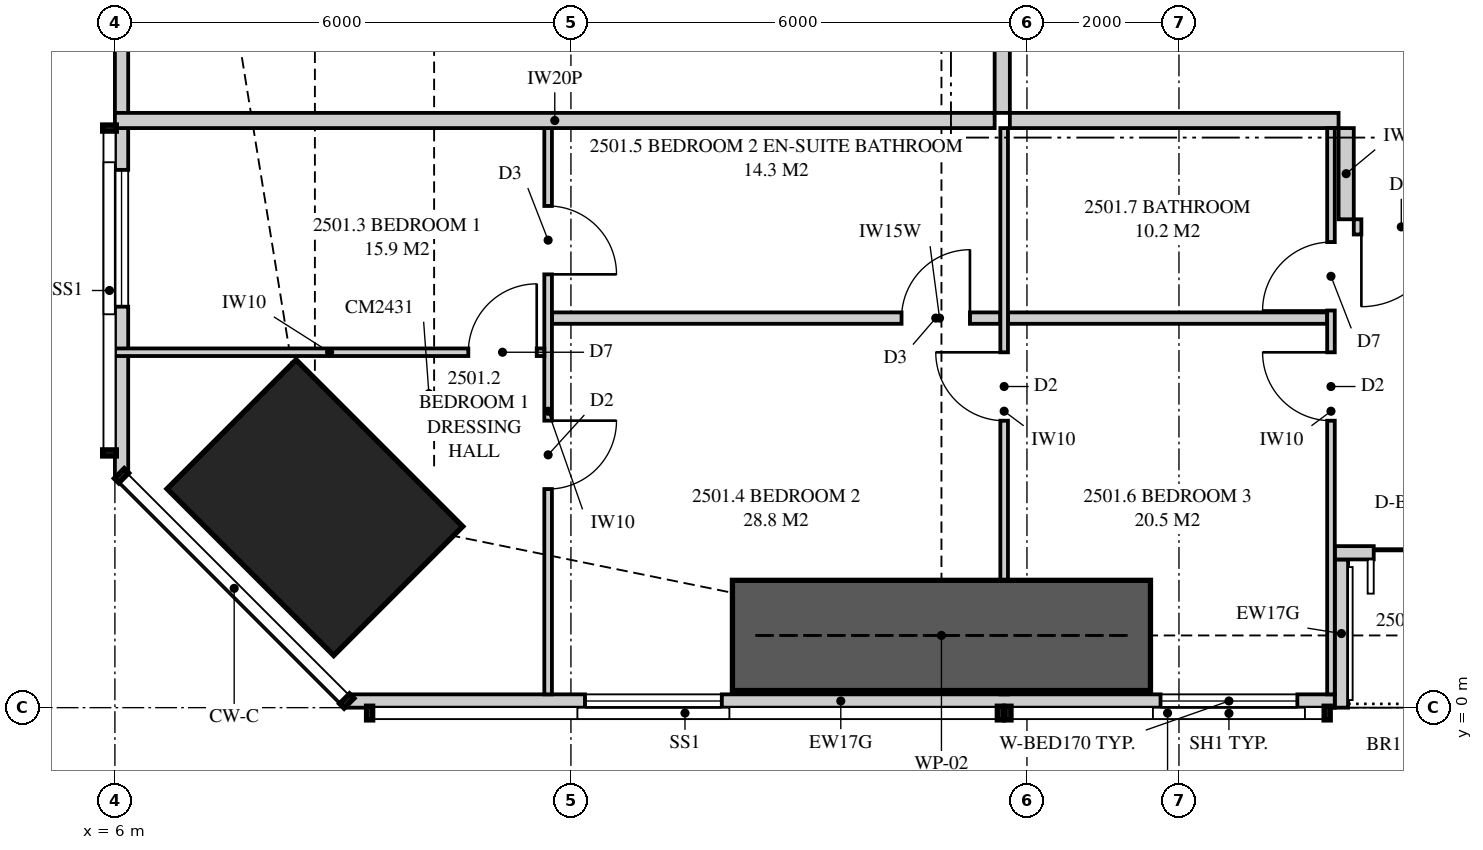
"""IFC4 building model, lengths in metres.
Left out: names, types, materials, properties, quantities, classifications, styles, units other than length and angle.
Written with IfcOpenShell. Run it as: python <this file> out.ifc"""

import sys

from ifc_helpers import new_model, si_unit, direction, frame, frame_2d, origin, origin_2d, place, context, subcontext, project, spatial, polyline, rectangle, outline, extrude, element, fill, save


model = new_model("IFC4")
c1 = context("Model", 3, precision=1e-05, world=origin(), true_north=direction((0.0, 1.0)))
c2 = subcontext(c1, "Body", "Model", "MODEL_VIEW")
j1 = project(units=[si_unit("LENGTHUNIT", "METRE"), si_unit("PLANEANGLEUNIT", "RADIAN")], contexts=[c1])
p1 = place(None, origin())
s1 = spatial("IfcSite", under=j1, at=p1, CompositionType="ELEMENT")
p2 = place(p1, origin())
s2 = spatial("IfcBuilding", under=s1, at=p2, CompositionType="ELEMENT")
p3 = place(p2, frame((0.0, 0.0, 94.8)))
s3 = spatial("IfcBuildingStorey", under=s2, at=p3, CompositionType="ELEMENT", Elevation=94.8)
p4 = place(p3, frame((8.631, 2.631, 0.0), z_axis=(0.0, 0.0, 1.0), x_axis=(0.707106781187, 0.707106781187, 0.0)))
e1 = element("IfcColumn", 1, at=p4, inside=s3, PredefinedType="COLUMN", context=c2, shape_type="SweptSolid", body=[
    extrude(rectangle(XDim=2.4, YDim=3.1, at=origin_2d()), origin(), (0.0, 0.0, 1.0), 3.35),
])
p5 = place(p3, frame((9.051, 0.087, 0.0), z_axis=(0.0, 0.0, 1.0), x_axis=(1.0, 0.0, 0.0)))
e2 = element("IfcWall", 2, at=p5, inside=s3, PredefinedType="SOLIDWALL", context=c2, shape_type="SweptSolid", body=[
    extrude(outline(polyline([(0.0, 0.0), (12.999, 0.0), (12.999, 2.15), (7.824, 2.15), (7.824, 3.11), (7.666, 3.11), (7.666, 2.15), (7.62, 2.15), (7.62, 3.11), (0.0, 3.11), (0.0, 0.0)])), frame((0.0, 0.087, 0.0), z_axis=(0.0, -1.0, 0.0), x_axis=(1.0, 0.0, 0.0)), (0.0, 0.0, 1.0), 0.175),
])
p6 = place(p5, frame((3.134, 0.0, 0.4)))
e3 = element("IfcOpeningElement", 3, at=p6, cuts=e2, PredefinedType="OPENING", context=c2, shape_type="SweptSolid", body=[
    extrude(rectangle(XDim=1.8, YDim=1.7, at=frame_2d((0.9, 0.85))), frame((0.0, 0.097, 0.0), z_axis=(0.0, -1.0, 0.0), x_axis=(1.0, 0.0, 0.0)), (0.0, 0.0, 1.0), 0.195),
])
p7 = place(p5, frame((10.706, 0.0, 0.4)))
e4 = element("IfcOpeningElement", 4, at=p7, cuts=e2, PredefinedType="OPENING", context=c2, shape_type="SweptSolid", body=[
    extrude(rectangle(XDim=1.8, YDim=1.7, at=frame_2d((0.9, 0.85))), frame((0.0, 0.097, 0.0), z_axis=(0.0, -1.0, 0.0), x_axis=(1.0, 0.0, 0.0)), (0.0, 0.0, 1.0), 0.195),
])
p8 = place(p3, frame((22.05, 2.038, 0.0), z_axis=(0.0, 0.0, 1.0), x_axis=(1.0, 0.0, 0.0)))
e5 = element("IfcWall", 5, at=p8, inside=s3, PredefinedType="SOLIDWALL", context=c2, shape_type="SweptSolid", body=[
    extrude(rectangle(XDim=2.825, YDim=0.175, at=frame_2d((1.413, 0.0))), origin(), (0.0, 0.0, 1.0), 3.11),
])
p9 = place(p8, frame((0.512, 0.0, 0.0)))
e6 = element("IfcOpeningElement", 6, at=p9, cuts=e5, PredefinedType="OPENING", context=c2, shape_type="SweptSolid", body=[
    extrude(rectangle(XDim=1.8, YDim=2.1, at=frame_2d((0.9, 1.05))), frame((0.0, 0.097, 0.0), z_axis=(0.0, -1.0, 0.0), x_axis=(1.0, 0.0, 0.0)), (0.0, 0.0, 1.0), 0.195),
])
p10 = place(p3, frame((22.137, 0.0, 0.0), z_axis=(0.0, 0.0, 1.0), x_axis=(0.0, 1.0, 0.0)))
e7 = element("IfcWall", 7, at=p10, inside=s3, PredefinedType="SOLIDWALL", context=c2, shape_type="SweptSolid", body=[
    extrude(outline(polyline([(0.0, 0.0), (1.95, 0.0), (1.95, 3.11), (1.75, 3.11), (1.75, 2.15), (0.15, 2.15), (0.15, 3.11), (0.0, 3.11), (0.0, 0.0)])), frame((0.0, 0.087, 0.0), z_axis=(0.0, -1.0, 0.0), x_axis=(1.0, 0.0, 0.0)), (0.0, 0.0, 1.0), 0.175),
])
p11 = place(p3, frame((6.087, 19.137, 0.0), z_axis=(0.0, 0.0, 1.0), x_axis=(0.0, -1.0, 0.0)))
e8 = element("IfcWall", 8, at=p11, inside=s3, PredefinedType="SOLIDWALL", context=c2, shape_type="SweptSolid", body=[
    extrude(outline(polyline([(0.0, 0.0), (16.086, 0.0), (16.086, 3.11), (6.356, 3.11), (6.356, 2.15), (6.263, 2.15), (6.263, 3.11), (6.137, 3.11), (6.137, 2.15), (0.0, 2.15), (0.0, 0.0)])), frame((0.0, 0.087, 0.0), z_axis=(0.0, -1.0, 0.0), x_axis=(1.0, 0.0, 0.0)), (0.0, 0.0, 1.0), 0.175),
])
p12 = place(p11, frame((1.481, 0.0, 0.4)))
e9 = element("IfcOpeningElement", 9, at=p12, cuts=e8, PredefinedType="OPENING", context=c2, shape_type="SweptSolid", body=[
    extrude(rectangle(XDim=1.8, YDim=1.7, at=frame_2d((0.9, 0.85))), frame((0.0, 0.097, 0.0), z_axis=(0.0, -1.0, 0.0), x_axis=(1.0, 0.0, 0.0)), (0.0, 0.0, 1.0), 0.195),
])
p13 = place(p11, frame((9.076, 0.0, 0.4)))
e10 = element("IfcOpeningElement", 10, at=p13, cuts=e8, PredefinedType="OPENING", context=c2, shape_type="SweptSolid", body=[
    extrude(rectangle(XDim=1.2, YDim=1.7, at=frame_2d((0.6, 0.85))), frame((0.0, 0.097, 0.0), z_axis=(0.0, -1.0, 0.0), x_axis=(1.0, 0.0, 0.0)), (0.0, 0.0, 1.0), 0.195),
])
p14 = place(p11, frame((12.062, 0.0, 0.4)))
e11 = element("IfcOpeningElement", 11, at=p14, cuts=e8, PredefinedType="OPENING", context=c2, shape_type="SweptSolid", body=[
    extrude(rectangle(XDim=1.8, YDim=1.7, at=frame_2d((0.9, 0.85))), frame((0.0, 0.097, 0.0), z_axis=(0.0, -1.0, 0.0), x_axis=(1.0, 0.0, 0.0)), (0.0, 0.0, 1.0), 0.195),
])
p15 = place(p3, frame((17.775, 7.725, 0.0), z_axis=(0.0, 0.0, 1.0), x_axis=(1.0, 0.0, 0.0)))
e12 = element("IfcWall", 12, at=p15, inside=s3, PredefinedType="PARTITIONING", context=c2, shape_type="SweptSolid", body=[
    extrude(rectangle(XDim=4.325, YDim=0.2, at=frame_2d((2.163, 0.0))), origin(), (0.0, 0.0, 1.0), 3.11),
])
p16 = place(p3, frame((11.7, 0.175, 0.0), z_axis=(0.0, 0.0, 1.0), x_axis=(0.0, 1.0, 0.0)))
e13 = element("IfcWall", 13, at=p16, inside=s3, PredefinedType="PARTITIONING", context=c2, shape_type="SweptSolid", body=[
    extrude(outline(polyline([(0.0, 0.0), (7.45, 0.0), (7.45, 3.11), (2.708, 3.11), (2.708, 2.15), (0.953, 2.15), (0.953, 3.11), (0.0, 3.11), (0.0, 0.0)])), frame((0.0, 0.05, 0.0), z_axis=(0.0, -1.0, 0.0), x_axis=(1.0, 0.0, 0.0)), (0.0, 0.0, 1.0), 0.1),
])
p17 = place(p16, frame((2.701, 0.0, 0.0)))
e14 = element("IfcOpeningElement", 14, at=p17, cuts=e13, PredefinedType="OPENING", context=c2, shape_type="SweptSolid", body=[
    extrude(rectangle(XDim=0.9, YDim=2.1, at=frame_2d((0.45, 1.05))), frame((0.0, 0.06, 0.0), z_axis=(0.0, -1.0, 0.0), x_axis=(1.0, 0.0, 0.0)), (0.0, 0.0, 1.0), 0.12),
])
p18 = place(p16, frame((5.525, 0.0, 0.0)))
e15 = element("IfcOpeningElement", 15, at=p18, cuts=e13, PredefinedType="OPENING", context=c2, shape_type="SweptSolid", body=[
    extrude(rectangle(XDim=0.9, YDim=2.1, at=frame_2d((0.45, 1.05))), frame((0.0, 0.06, 0.0), z_axis=(0.0, -1.0, 0.0), x_axis=(1.0, 0.0, 0.0)), (0.0, 0.0, 1.0), 0.12),
])
p19 = place(p3, frame((17.7, 0.175, 0.0), z_axis=(0.0, 0.0, 1.0), x_axis=(0.0, 1.0, 0.0)))
e16 = element("IfcWall", 16, at=p19, inside=s3, PredefinedType="PARTITIONING", context=c2, shape_type="SweptSolid", body=[
    extrude(outline(polyline([(1.635, 2.15), (0.0, 2.15), (0.0, 0.0), (7.45, 0.0), (7.45, 3.11), (1.635, 3.11), (1.635, 2.15)]), holes=[polyline([(1.021, 0.116), (0.529, 0.116), (0.529, 0.906), (1.021, 0.906), (1.021, 0.116)]), polyline([(1.021, 1.244), (0.529, 1.244), (0.529, 2.034), (1.021, 2.034), (1.021, 1.244)])]), frame((0.0, 0.05, 0.0), z_axis=(0.0, -1.0, 0.0), x_axis=(1.0, 0.0, 0.0)), (0.0, 0.0, 1.0), 0.1),
])
p20 = place(p19, frame((3.6, 0.0, 0.0)))
e17 = element("IfcOpeningElement", 17, at=p20, cuts=e16, PredefinedType="OPENING", context=c2, shape_type="SweptSolid", body=[
    extrude(rectangle(XDim=0.9, YDim=2.1, at=frame_2d((0.45, 1.05))), frame((0.0, 0.06, 0.0), z_axis=(0.0, -1.0, 0.0), x_axis=(1.0, 0.0, 0.0)), (0.0, 0.0, 1.0), 0.12),
])
p21 = place(p3, frame((22.0, 0.175, 0.0), z_axis=(0.0, 0.0, 1.0), x_axis=(0.0, 1.0, 0.0)))
e18 = element("IfcWall", 18, at=p21, inside=s3, PredefinedType="PARTITIONING", context=c2, shape_type="SweptSolid", body=[
    extrude(outline(polyline([(0.0, 0.0), (7.45, 0.0), (7.45, 3.11), (1.635, 3.11), (1.635, 2.15), (0.0, 2.15), (0.0, 3.11), (0.0, 0.0)])), frame((0.0, 0.05, 0.0), z_axis=(0.0, -1.0, 0.0), x_axis=(1.0, 0.0, 0.0)), (0.0, 0.0, 1.0), 0.1),
])
p22 = place(p21, frame((3.6, 0.0, 0.0)))
e19 = element("IfcOpeningElement", 19, at=p22, cuts=e18, PredefinedType="OPENING", context=c2, shape_type="SweptSolid", body=[
    extrude(rectangle(XDim=0.9, YDim=2.1, at=frame_2d((0.45, 1.05))), frame((0.0, 0.06, 0.0), z_axis=(0.0, -1.0, 0.0), x_axis=(1.0, 0.0, 0.0)), (0.0, 0.0, 1.0), 0.12),
])
p23 = place(p21, frame((5.05, 0.0, 0.0)))
e20 = element("IfcOpeningElement", 20, at=p23, cuts=e18, PredefinedType="OPENING", context=c2, shape_type="SweptSolid", body=[
    extrude(rectangle(XDim=0.9, YDim=2.1, at=frame_2d((0.45, 1.05))), frame((0.0, 0.06, 0.0), z_axis=(0.0, -1.0, 0.0), x_axis=(1.0, 0.0, 0.0)), (0.0, 0.0, 1.0), 0.12),
])
p24 = place(p3, frame((6.0, 4.676, 0.0), z_axis=(0.0, 0.0, 1.0), x_axis=(1.0, 0.0, 0.0)))
e21 = element("IfcWall", 21, at=p24, inside=s3, PredefinedType="PARTITIONING", context=c2, shape_type="SweptSolid", body=[
    extrude(outline(polyline([(0.0, 0.0), (5.65, 0.0), (5.65, 3.11), (5.46, 3.11), (5.46, 2.51), (3.171, 2.51), (3.171, 2.15), (1.429, 2.15), (1.429, 3.11), (0.0, 3.11), (0.0, 0.0)])), frame((0.0, 0.05, 0.0), z_axis=(0.0, -1.0, 0.0), x_axis=(1.0, 0.0, 0.0)), (0.0, 0.0, 1.0), 0.1),
])
p25 = place(p24, frame((4.65, 0.0, 0.0)))
e22 = element("IfcOpeningElement", 22, at=p25, cuts=e21, PredefinedType="OPENING", context=c2, shape_type="SweptSolid", body=[
    extrude(rectangle(XDim=0.9, YDim=2.1, at=frame_2d((0.45, 1.05))), frame((0.0, 0.06, 0.0), z_axis=(0.0, -1.0, 0.0), x_axis=(1.0, 0.0, 0.0)), (0.0, 0.0, 1.0), 0.12),
])
p26 = place(p3, frame((11.75, 5.125, 0.0), z_axis=(0.0, 0.0, 1.0), x_axis=(1.0, 0.0, 0.0)))
e23 = element("IfcWall", 23, at=p26, inside=s3, PredefinedType="PLUMBINGWALL", context=c2, shape_type="SweptSolid", body=[
    extrude(outline(polyline([(0.0, 0.0), (5.9, 0.0), (5.9, 3.11), (5.438, 3.11), (5.438, 2.541), (4.812, 2.541), (4.812, 3.11), (0.0, 3.11), (0.0, 0.0)])), frame((0.0, 0.075, 0.0), z_axis=(0.0, -1.0, 0.0), x_axis=(1.0, 0.0, 0.0)), (0.0, 0.0, 1.0), 0.15),
])
p27 = place(p26, frame((4.6, 0.0, 0.0)))
e24 = element("IfcOpeningElement", 24, at=p27, cuts=e23, PredefinedType="OPENING", context=c2, shape_type="SweptSolid", body=[
    extrude(rectangle(XDim=0.9, YDim=2.1, at=frame_2d((0.45, 1.05))), frame((0.0, 0.085, 0.0), z_axis=(0.0, -1.0, 0.0), x_axis=(1.0, 0.0, 0.0)), (0.0, 0.0, 1.0), 0.17),
])
p28 = place(p3, frame((17.75, 5.125, 0.0), z_axis=(0.0, 0.0, 1.0), x_axis=(1.0, 0.0, 0.0)))
e25 = element("IfcWall", 25, at=p28, inside=s3, PredefinedType="PLUMBINGWALL", context=c2, shape_type="SweptSolid", body=[
    extrude(rectangle(XDim=4.2, YDim=0.15, at=frame_2d((2.1, 0.0))), origin(), (0.0, 0.0, 1.0), 3.11),
])
p29 = place(p3, frame((6.0, 7.725, 0.0), z_axis=(0.0, 0.0, 1.0), x_axis=(1.0, 0.0, 0.0)))
e26 = element("IfcWall", 26, at=p29, inside=s3, PredefinedType="PARTITIONING", context=c2, shape_type="SweptSolid", body=[
    extrude(outline(polyline([(0.0, 0.0), (11.575, 0.0), (11.575, 3.11), (11.212, 3.11), (11.212, 2.541), (10.538, 2.541), (10.538, 3.11), (5.51, 3.11), (5.51, 2.51), (2.969, 2.51), (2.969, 2.541), (2.727, 2.541), (2.727, 2.15), (0.884, 2.15), (0.884, 3.11), (0.0, 3.11), (0.0, 0.0)])), frame((0.0, 0.1, 0.0), z_axis=(0.0, -1.0, 0.0), x_axis=(1.0, 0.0, 0.0)), (0.0, 0.0, 1.0), 0.2),
])
p30 = place(p3, frame((17.675, 7.825, 0.0), z_axis=(0.0, 0.0, 1.0), x_axis=(0.0, 1.0, 0.0)))
e27 = element("IfcWall", 27, at=p30, inside=s3, PredefinedType="PARTITIONING", context=c2, shape_type="SweptSolid", body=[
    extrude(outline(polyline([(0.0, 0.0), (5.825, 0.0), (5.825, 3.11), (3.087, 3.11), (3.087, 2.541), (2.413, 2.541), (2.413, 3.11), (0.0, 3.11), (0.0, 0.0)])), frame((0.0, 0.1, 0.0), z_axis=(0.0, -1.0, 0.0), x_axis=(1.0, 0.0, 0.0)), (0.0, 0.0, 1.0), 0.2),
])
p31 = place(p30, frame((2.337, 0.0, 0.0)))
e28 = element("IfcOpeningElement", 28, at=p31, cuts=e27, PredefinedType="OPENING", context=c2, shape_type="SweptSolid", body=[
    extrude(rectangle(XDim=1.8, YDim=2.1, at=frame_2d((0.9, 1.05))), frame((0.0, 0.11, 0.0), z_axis=(0.0, -1.0, 0.0), x_axis=(1.0, 0.0, 0.0)), (0.0, 0.0, 1.0), 0.22),
])
p32 = place(p3, frame((22.3, 6.325, 0.0), z_axis=(0.0, 0.0, 1.0), x_axis=(1.0, 0.0, 0.0)))
e29 = element("IfcWall", 29, at=p32, inside=s3, PredefinedType="PARTITIONING", context=c2, shape_type="SweptSolid", body=[
    extrude(rectangle(XDim=2.4, YDim=0.2, at=frame_2d((1.2, 0.0))), origin(), (0.0, 0.0, 1.0), 3.11),
])
p33 = place(p32, frame((0.1, 0.0, 0.0)))
e30 = element("IfcOpeningElement", 30, at=p33, cuts=e29, PredefinedType="OPENING", context=c2, shape_type="SweptSolid", body=[
    extrude(rectangle(XDim=1.05, YDim=2.2, at=frame_2d((0.525, 1.1))), frame((0.0, 0.11, 0.0), z_axis=(0.0, -1.0, 0.0), x_axis=(1.0, 0.0, 0.0)), (0.0, 0.0, 1.0), 0.22),
])
p34 = place(p3, frame((22.2, 7.625, 0.0), z_axis=(0.0, 0.0, 1.0), x_axis=(0.0, -1.0, 0.0)))
e31 = element("IfcWall", 31, at=p34, inside=s3, PredefinedType="PARTITIONING", context=c2, shape_type="SweptSolid", body=[
    extrude(rectangle(XDim=1.2, YDim=0.2, at=frame_2d((0.6, 0.0))), origin(), (0.0, 0.0, 1.0), 3.11),
])
p35 = place(p3, frame((14.125, 0.95, 0.0), z_axis=(0.0, 0.0, 1.0), x_axis=(1.0, 0.0, 0.0)))
e32 = element("IfcWall", 32, at=p35, inside=s3, PredefinedType="SHEAR", context=c2, shape_type="SweptSolid", body=[
    extrude(rectangle(XDim=5.5, YDim=1.45, at=frame_2d((2.75, 0.0))), origin(), (0.0, 0.0, 1.0), 3.35),
])
p36 = place(p6, origin())
e33 = element("IfcWindow", 33, at=p36, inside=s3, PartitioningType="SINGLE_PANEL", PredefinedType="WINDOW", context=c2, shape_type="SweptSolid", body=[
    extrude(rectangle(XDim=1.8, YDim=1.7, at=frame_2d((0.9, 0.85))), frame((0.0, 0.03, 0.0), z_axis=(0.0, -1.0, 0.0), x_axis=(1.0, 0.0, 0.0)), (0.0, 0.0, 1.0), 0.06),
])
fill(e3, e33)
p37 = place(p7, origin())
e34 = element("IfcWindow", 34, at=p37, inside=s3, PartitioningType="SINGLE_PANEL", PredefinedType="WINDOW", context=c2, shape_type="SweptSolid", body=[
    extrude(rectangle(XDim=1.8, YDim=1.7, at=frame_2d((0.9, 0.85))), frame((0.0, 0.03, 0.0), z_axis=(0.0, -1.0, 0.0), x_axis=(1.0, 0.0, 0.0)), (0.0, 0.0, 1.0), 0.06),
])
fill(e4, e34)
p38 = place(p9, origin())
e35 = element("IfcDoor", 35, at=p38, inside=s3, OperationType="SLIDING_TO_LEFT", PredefinedType="DOOR", context=c2, shape_type="SweptSolid", body=[
    extrude(rectangle(XDim=1.8, YDim=2.1, at=frame_2d((0.9, 1.05))), frame((0.0, 0.025, 0.0), z_axis=(0.0, -1.0, 0.0), x_axis=(1.0, 0.0, 0.0)), (0.0, 0.0, 1.0), 0.05),
])
fill(e6, e35)
p39 = place(p14, origin())
e36 = element("IfcWindow", 36, at=p39, inside=s3, PartitioningType="SINGLE_PANEL", PredefinedType="WINDOW", context=c2, shape_type="SweptSolid", body=[
    extrude(rectangle(XDim=1.8, YDim=1.7, at=frame_2d((0.9, 0.85))), frame((0.0, 0.03, 0.0), z_axis=(0.0, -1.0, 0.0), x_axis=(1.0, 0.0, 0.0)), (0.0, 0.0, 1.0), 0.06),
])
fill(e11, e36)
p40 = place(p33, frame((1.05, 0.0, 0.0), z_axis=(0.0, 0.0, 1.0), x_axis=(-1.0, 0.0, 0.0)))
e37 = element("IfcDoor", 37, at=p40, inside=s3, OperationType="SINGLE_SWING_RIGHT", PredefinedType="DOOR", context=c2, shape_type="SweptSolid", body=[
    extrude(rectangle(XDim=1.05, YDim=2.2, at=frame_2d((0.525, 1.1))), frame((0.0, 0.025, 0.0), z_axis=(0.0, -1.0, 0.0), x_axis=(1.0, 0.0, 0.0)), (0.0, 0.0, 1.0), 0.05),
])
fill(e30, e37)
p41 = place(p25, origin())
e38 = element("IfcDoor", 38, at=p41, inside=s3, OperationType="SINGLE_SWING_RIGHT", PredefinedType="DOOR", context=c2, shape_type="SweptSolid", body=[
    extrude(rectangle(XDim=0.9, YDim=2.1, at=frame_2d((0.45, 1.05))), frame((0.0, 0.025, 0.0), z_axis=(0.0, -1.0, 0.0), x_axis=(1.0, 0.0, 0.0)), (0.0, 0.0, 1.0), 0.05),
])
fill(e22, e38)
p42 = place(p17, frame((0.9, 0.0, 0.0), z_axis=(0.0, 0.0, 1.0), x_axis=(-1.0, 0.0, 0.0)))
e39 = element("IfcDoor", 39, at=p42, inside=s3, OperationType="SINGLE_SWING_LEFT", PredefinedType="DOOR", context=c2, shape_type="SweptSolid", body=[
    extrude(rectangle(XDim=0.9, YDim=2.1, at=frame_2d((0.45, 1.05))), frame((0.0, 0.025, 0.0), z_axis=(0.0, -1.0, 0.0), x_axis=(1.0, 0.0, 0.0)), (0.0, 0.0, 1.0), 0.05),
])
fill(e14, e39)
p43 = place(p20, origin())
e40 = element("IfcDoor", 40, at=p43, inside=s3, OperationType="SINGLE_SWING_RIGHT", PredefinedType="DOOR", context=c2, shape_type="SweptSolid", body=[
    extrude(rectangle(XDim=0.9, YDim=2.1, at=frame_2d((0.45, 1.05))), frame((0.0, 0.025, 0.0), z_axis=(0.0, -1.0, 0.0), x_axis=(1.0, 0.0, 0.0)), (0.0, 0.0, 1.0), 0.05),
])
fill(e17, e40)
p44 = place(p27, origin())
e41 = element("IfcDoor", 41, at=p44, inside=s3, OperationType="SINGLE_SWING_RIGHT", PredefinedType="DOOR", context=c2, shape_type="SweptSolid", body=[
    extrude(rectangle(XDim=0.9, YDim=2.1, at=frame_2d((0.45, 1.05))), frame((0.0, 0.025, 0.0), z_axis=(0.0, -1.0, 0.0), x_axis=(1.0, 0.0, 0.0)), (0.0, 0.0, 1.0), 0.05),
])
fill(e24, e41)
p45 = place(p22, origin())
e42 = element("IfcDoor", 42, at=p45, inside=s3, OperationType="SINGLE_SWING_RIGHT", PredefinedType="DOOR", context=c2, shape_type="SweptSolid", body=[
    extrude(rectangle(XDim=0.9, YDim=2.1, at=frame_2d((0.45, 1.05))), frame((0.0, 0.025, 0.0), z_axis=(0.0, -1.0, 0.0), x_axis=(1.0, 0.0, 0.0)), (0.0, 0.0, 1.0), 0.05),
])
fill(e19, e42)
p46 = place(p23, origin())
e43 = element("IfcDoor", 43, at=p46, inside=s3, OperationType="SINGLE_SWING_LEFT", PredefinedType="DOOR", context=c2, shape_type="SweptSolid", body=[
    extrude(rectangle(XDim=0.9, YDim=2.1, at=frame_2d((0.45, 1.05))), frame((0.0, 0.025, 0.0), z_axis=(0.0, -1.0, 0.0), x_axis=(1.0, 0.0, 0.0)), (0.0, 0.0, 1.0), 0.05),
])
fill(e20, e43)
p47 = place(p18, frame((0.9, 0.0, 0.0), z_axis=(0.0, 0.0, 1.0), x_axis=(-1.0, 0.0, 0.0)))
e44 = element("IfcDoor", 44, at=p47, inside=s3, OperationType="SINGLE_SWING_RIGHT", PredefinedType="DOOR", context=c2, shape_type="SweptSolid", body=[
    extrude(rectangle(XDim=0.9, YDim=2.1, at=frame_2d((0.45, 1.05))), frame((0.0, 0.025, 0.0), z_axis=(0.0, -1.0, 0.0), x_axis=(1.0, 0.0, 0.0)), (0.0, 0.0, 1.0), 0.05),
])
fill(e15, e44)
save(model, sys.argv[1])
